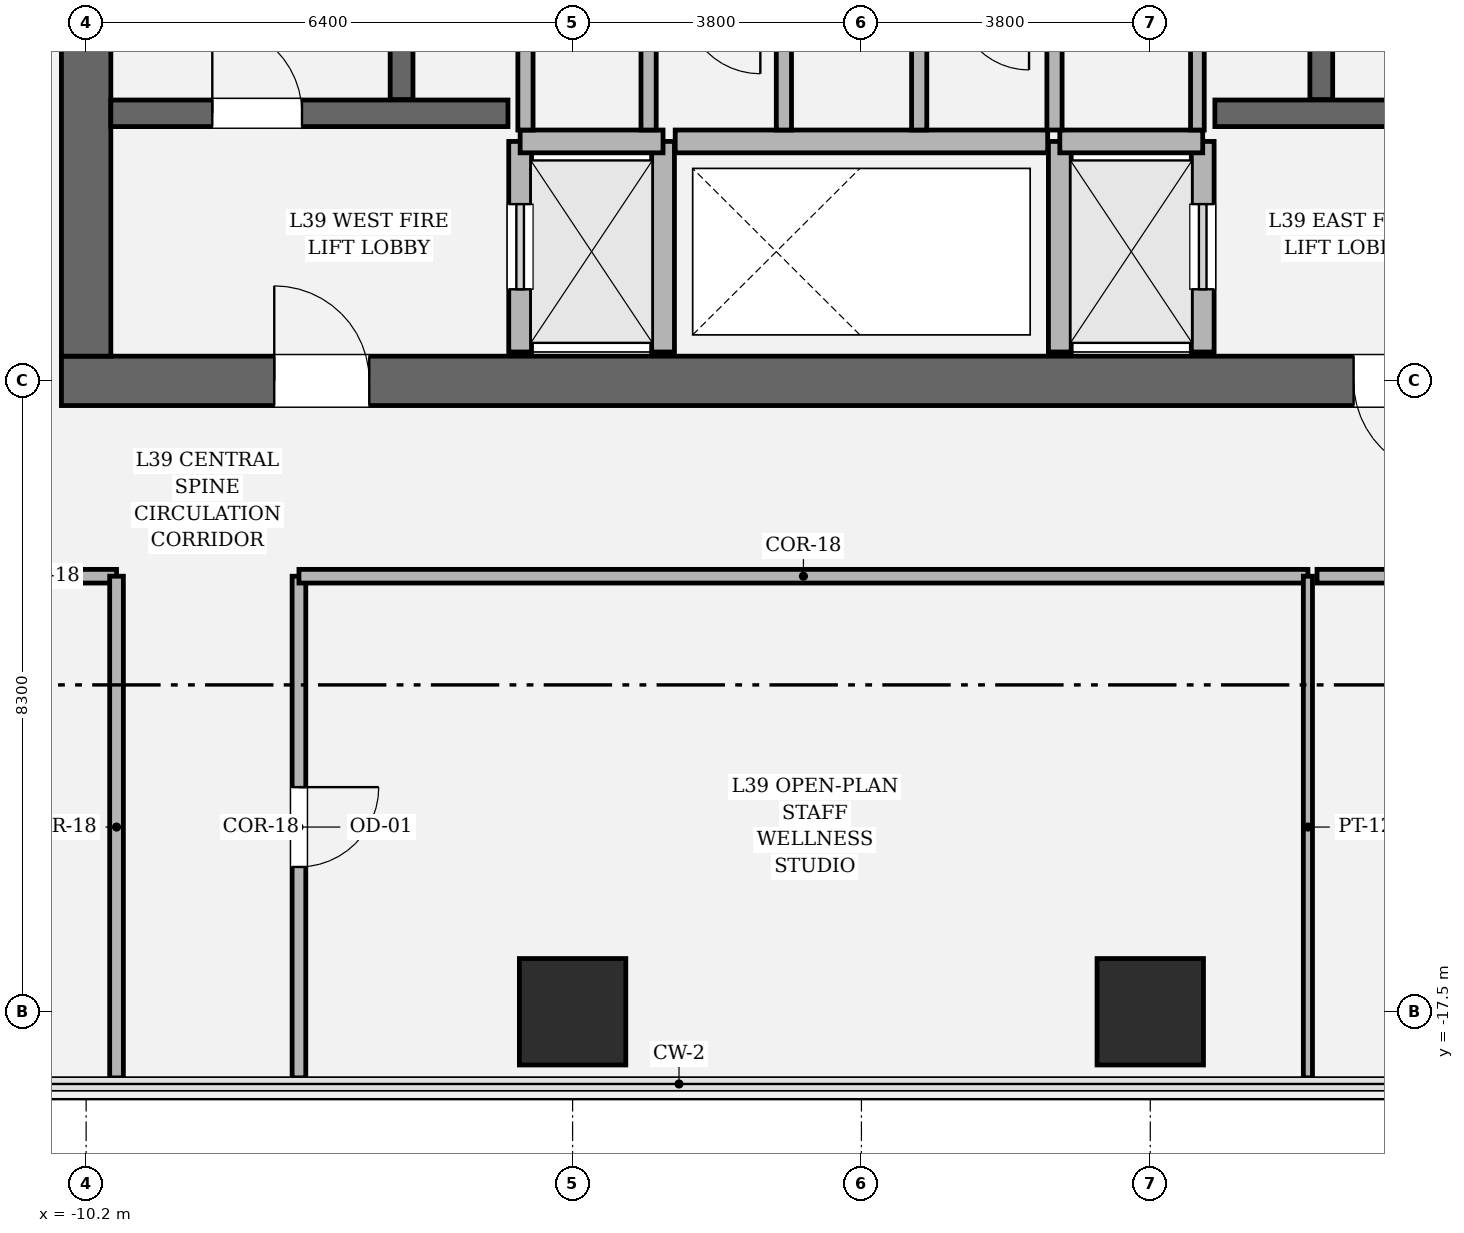
"""IFC4 building model, lengths in metres.
Left out: names, types, materials, properties, quantities, classifications, styles, units other than length and angle.
Written with IfcOpenShell. Run it as: python <this file> out.ifc"""

import sys

from ifc_helpers import new_model, si_unit, direction, frame, frame_2d, origin, origin_2d, place, context, subcontext, project, spatial, rectangle, hollow_rectangle, extrude, element, fill, save


model = new_model("IFC4")
c1 = context("Model", 3, precision=1e-05, world=origin(), true_north=direction((0.0, 1.0)))
c2 = subcontext(c1, "Body", "Model", "MODEL_VIEW")
j1 = project(units=[si_unit("LENGTHUNIT", "METRE"), si_unit("PLANEANGLEUNIT", "RADIAN")], contexts=[c1])
p1 = place(None, origin())
s1 = spatial("IfcSite", under=j1, at=p1, CompositionType="ELEMENT")
p2 = place(p1, origin())
s2 = spatial("IfcBuilding", under=s1, at=p2, CompositionType="ELEMENT")
p3 = place(p2, frame((0.0, 0.0, 168.15)))
s3 = spatial("IfcBuildingStorey", under=s2, at=p3, CompositionType="ELEMENT", Elevation=168.15)
p4 = place(p3, frame((10.525, -9.2, 0.0), z_axis=(0.0, 0.0, 1.0), x_axis=(-1.0, 0.0, 0.0)))
e1 = element("IfcWall", 1, at=p4, inside=s3, PredefinedType="SHEAR", context=c2, shape_type="SweptSolid", body=[
    extrude(rectangle(XDim=21.05, YDim=0.65, at=frame_2d((10.525, 0.0))), origin(), (0.0, 0.0, 1.0), 4.05),
])
p5 = place(p4, frame((2.8, 0.0, 0.0)))
e2 = element("IfcOpeningElement", 2, at=p5, cuts=e1, PredefinedType="OPENING", context=c2, shape_type="SweptSolid", body=[
    extrude(rectangle(XDim=1.25, YDim=2.25, at=frame_2d((0.625, 1.125))), frame((0.0, 0.335, 0.0), z_axis=(0.0, -1.0, 0.0), x_axis=(1.0, 0.0, 0.0)), (0.0, 0.0, 1.0), 0.67),
])
p6 = place(p4, frame((17.0, 0.0, 0.0)))
e3 = element("IfcOpeningElement", 3, at=p6, cuts=e1, PredefinedType="OPENING", context=c2, shape_type="SweptSolid", body=[
    extrude(rectangle(XDim=1.25, YDim=2.25, at=frame_2d((0.625, 1.125))), frame((0.0, 0.335, 0.0), z_axis=(0.0, -1.0, 0.0), x_axis=(1.0, 0.0, 0.0)), (0.0, 0.0, 1.0), 0.67),
])
p7 = place(p3, frame((-10.2, -8.875, 0.0), z_axis=(0.0, 0.0, 1.0), x_axis=(0.0, 1.0, 0.0)))
e4 = element("IfcWall", 4, at=p7, inside=s3, PredefinedType="SHEAR", context=c2, shape_type="SweptSolid", body=[
    extrude(rectangle(XDim=17.75, YDim=0.65, at=frame_2d((8.875, 0.0))), origin(), (0.0, 0.0, 1.0), 4.05),
])
p8 = place(p7, frame((12.665, 0.0, 0.0)))
e5 = element("IfcOpeningElement", 5, at=p8, cuts=e4, PredefinedType="OPENING", context=c2, shape_type="SweptSolid", body=[
    extrude(rectangle(XDim=1.18, YDim=2.2, at=frame_2d((0.59, 1.1))), frame((0.0, 0.335, 0.0), z_axis=(0.0, -1.0, 0.0), x_axis=(1.0, 0.0, 0.0)), (0.0, 0.0, 1.0), 0.67),
])
for number, where, z_axis, x_axis in (
    (6, (-6.05, -5.5, 0.0), (0.0, 0.0, 1.0), (0.0, 1.0, 0.0)),
    (7, (6.05, 3.45, 0.0), (0.0, 0.0, 1.0), (0.0, -1.0, 0.0)),
):
    element("IfcWall", number, at=place(p3, frame(where, z_axis=z_axis, x_axis=x_axis)), inside=s3, PredefinedType="SOLIDWALL", context=c2, shape_type="SweptSolid", body=[
        extrude(rectangle(XDim=8.95, YDim=0.3, at=frame_2d((4.475, 0.0))), origin(), (0.0, 0.0, 1.0), 4.05),
    ])
p9 = place(p3, frame((-9.875, -5.68, 0.0), z_axis=(0.0, 0.0, 1.0), x_axis=(1.0, 0.0, 0.0)))
e8 = element("IfcWall", 8, at=p9, inside=s3, PredefinedType="SOLIDWALL", context=c2, shape_type="SweptSolid", body=[
    extrude(rectangle(XDim=5.225, YDim=0.35, at=frame_2d((2.613, 0.0))), origin(), (0.0, 0.0, 1.0), 4.05),
])
p10 = place(p9, frame((1.335, 0.0, 0.0)))
e9 = element("IfcOpeningElement", 9, at=p10, cuts=e8, PredefinedType="OPENING", context=c2, shape_type="SweptSolid", body=[
    extrude(rectangle(XDim=1.18, YDim=2.2, at=frame_2d((0.59, 1.1))), frame((0.0, 0.185, 0.0), z_axis=(0.0, -1.0, 0.0), x_axis=(1.0, 0.0, 0.0)), (0.0, 0.0, 1.0), 0.37),
])
p11 = place(p3, frame((4.65, -5.68, 0.0), z_axis=(0.0, 0.0, 1.0), x_axis=(1.0, 0.0, 0.0)))
e10 = element("IfcWall", 10, at=p11, inside=s3, PredefinedType="SOLIDWALL", context=c2, shape_type="SweptSolid", body=[
    extrude(rectangle(XDim=5.225, YDim=0.35, at=frame_2d((2.613, 0.0))), origin(), (0.0, 0.0, 1.0), 4.05),
])
p12 = place(p11, frame((2.71, 0.0, 0.0)))
e11 = element("IfcOpeningElement", 11, at=p12, cuts=e10, PredefinedType="OPENING", context=c2, shape_type="SweptSolid", body=[
    extrude(rectangle(XDim=1.18, YDim=2.2, at=frame_2d((0.59, 1.1))), frame((0.0, 0.185, 0.0), z_axis=(0.0, -1.0, 0.0), x_axis=(1.0, 0.0, 0.0)), (0.0, 0.0, 1.0), 0.37),
])
for number, where, z_axis, x_axis in (
    (12, (-3.8, -17.5, 0.0), (0.0, 0.0, 1.0), (1.0, 0.0, 0.0)),
    (13, (3.8, -17.5, 0.0), (0.0, 0.0, 1.0), (1.0, 0.0, 0.0)),
):
    element("IfcColumn", number, at=place(p3, frame(where, z_axis=z_axis, x_axis=x_axis)), inside=s3, PredefinedType="COLUMN", context=c2, shape_type="SweptSolid", body=[
        extrude(hollow_rectangle(XDim=1.4, YDim=1.4, WallThickness=0.042, at=origin_2d()), origin(), (0.0, 0.0, 1.0), 4.05),
    ])
p13 = place(p3, frame((-4.49, -8.82, 0.0), z_axis=(0.0, 0.0, 1.0), x_axis=(0.0, 1.0, 0.0)))
e14 = element("IfcWall", 14, at=p13, inside=s3, PredefinedType="SOLIDWALL", context=c2, shape_type="SweptSolid", body=[
    extrude(rectangle(XDim=2.77, YDim=0.3, at=frame_2d((1.385, 0.0))), origin(), (0.0, 0.0, 1.0), 3.77),
])
p14 = place(p13, frame((0.825, 0.0, 0.0)))
e15 = element("IfcOpeningElement", 15, at=p14, cuts=e14, PredefinedType="OPENING", context=c2, shape_type="SweptSolid", body=[
    extrude(rectangle(XDim=1.12, YDim=2.25, at=frame_2d((0.56, 1.125))), frame((0.0, 0.16, 0.0), z_axis=(0.0, -1.0, 0.0), x_axis=(1.0, 0.0, 0.0)), (0.0, 0.0, 1.0), 0.32),
])
p15 = place(p3, frame((-2.61, -8.82, 0.0), z_axis=(0.0, 0.0, 1.0), x_axis=(0.0, 1.0, 0.0)))
e16 = element("IfcWall", 16, at=p15, inside=s3, PredefinedType="SOLIDWALL", context=c2, shape_type="SweptSolid", body=[
    extrude(rectangle(XDim=2.77, YDim=0.3, at=frame_2d((1.385, 0.0))), origin(), (0.0, 0.0, 1.0), 3.77),
])
p16 = place(p3, frame((-4.49, -6.05, 0.0), z_axis=(0.0, 0.0, 1.0), x_axis=(1.0, 0.0, 0.0)))
e17 = element("IfcWall", 17, at=p16, inside=s3, PredefinedType="SOLIDWALL", context=c2, shape_type="SweptSolid", body=[
    extrude(rectangle(XDim=1.88, YDim=0.3, at=frame_2d((0.94, 0.0))), origin(), (0.0, 0.0, 1.0), 3.77),
])
p17 = place(p3, frame((4.49, -8.82, 0.0), z_axis=(0.0, 0.0, 1.0), x_axis=(0.0, 1.0, 0.0)))
e18 = element("IfcWall", 18, at=p17, inside=s3, PredefinedType="SOLIDWALL", context=c2, shape_type="SweptSolid", body=[
    extrude(rectangle(XDim=2.77, YDim=0.3, at=frame_2d((1.385, 0.0))), origin(), (0.0, 0.0, 1.0), 3.77),
])
p18 = place(p17, frame((0.825, 0.0, 0.0)))
e19 = element("IfcOpeningElement", 19, at=p18, cuts=e18, PredefinedType="OPENING", context=c2, shape_type="SweptSolid", body=[
    extrude(rectangle(XDim=1.12, YDim=2.25, at=frame_2d((0.56, 1.125))), frame((0.0, 0.16, 0.0), z_axis=(0.0, -1.0, 0.0), x_axis=(1.0, 0.0, 0.0)), (0.0, 0.0, 1.0), 0.32),
])
p19 = place(p3, frame((2.61, -8.82, 0.0), z_axis=(0.0, 0.0, 1.0), x_axis=(0.0, 1.0, 0.0)))
e20 = element("IfcWall", 20, at=p19, inside=s3, PredefinedType="SOLIDWALL", context=c2, shape_type="SweptSolid", body=[
    extrude(rectangle(XDim=2.77, YDim=0.3, at=frame_2d((1.385, 0.0))), origin(), (0.0, 0.0, 1.0), 3.77),
])
p20 = place(p3, frame((2.61, -6.05, 0.0), z_axis=(0.0, 0.0, 1.0), x_axis=(1.0, 0.0, 0.0)))
e21 = element("IfcWall", 21, at=p20, inside=s3, PredefinedType="SOLIDWALL", context=c2, shape_type="SweptSolid", body=[
    extrude(rectangle(XDim=1.88, YDim=0.3, at=frame_2d((0.94, 0.0))), origin(), (0.0, 0.0, 1.0), 3.77),
])
p21 = place(p3, frame((-2.45, -6.05, 0.0), z_axis=(0.0, 0.0, 1.0), x_axis=(1.0, 0.0, 0.0)))
e22 = element("IfcWall", 22, at=p21, inside=s3, PredefinedType="SOLIDWALL", context=c2, shape_type="SweptSolid", body=[
    extrude(rectangle(XDim=4.9, YDim=0.3, at=frame_2d((2.45, 0.0))), origin(), (0.0, 0.0, 1.0), 3.77),
])
for number, where, z_axis, x_axis in (
    (23, (-2.8, -5.9, 0.0), (0.0, 0.0, 1.0), (0.0, 1.0, 0.0)),
    (24, (-4.42, -4.16, 0.0), (0.0, 0.0, 1.0), (0.0, -1.0, 0.0)),
    (25, (-1.02, -5.9, 0.0), (0.0, 0.0, 1.0), (0.0, 1.0, 0.0)),
    (26, (0.76, -5.9, 0.0), (0.0, 0.0, 1.0), (0.0, 1.0, 0.0)),
    (27, (2.54, -5.9, 0.0), (0.0, 0.0, 1.0), (0.0, 1.0, 0.0)),
):
    element("IfcWall", number, at=place(p3, frame(where, z_axis=z_axis, x_axis=x_axis)), inside=s3, PredefinedType="SOLIDWALL", context=c2, shape_type="SweptSolid", body=[
        extrude(rectangle(XDim=1.74, YDim=0.2, at=frame_2d((0.87, 0.0))), origin(), (0.0, 0.0, 1.0), 3.77),
    ])
p22 = place(p3, frame((4.42, -5.9, 0.0), z_axis=(0.0, 0.0, 1.0), x_axis=(0.0, 1.0, 0.0)))
e28 = element("IfcWall", 28, at=p22, inside=s3, PredefinedType="PARTITIONING", context=c2, shape_type="SweptSolid", body=[
    extrude(rectangle(XDim=1.74, YDim=0.18, at=frame_2d((0.87, 0.0))), origin(), (0.0, 0.0, 1.0), 3.77),
])
p23 = place(p3, frame((-7.4, -18.37, 0.0), z_axis=(0.0, 0.0, 1.0), x_axis=(0.0, 1.0, 0.0)))
e29 = element("IfcWall", 29, at=p23, inside=s3, PredefinedType="PARTITIONING", context=c2, shape_type="SweptSolid", body=[
    extrude(rectangle(XDim=6.6, YDim=0.18, at=frame_2d((3.3, 0.0))), origin(), (0.0, 0.0, 1.0), 2.444),
])
p24 = place(p23, frame((2.775, 0.0, 0.0)))
e30 = element("IfcOpeningElement", 30, at=p24, cuts=e29, PredefinedType="OPENING", context=c2, shape_type="SweptSolid", body=[
    extrude(rectangle(XDim=1.05, YDim=2.2, at=frame_2d((0.525, 1.1))), frame((0.0, 0.1, 0.0), z_axis=(0.0, -1.0, 0.0), x_axis=(1.0, 0.0, 0.0)), (0.0, 0.0, 1.0), 0.2),
])
p25 = place(p3, frame((-7.4, -11.77, 0.0), z_axis=(0.0, 0.0, 1.0), x_axis=(1.0, 0.0, 0.0)))
e31 = element("IfcWall", 31, at=p25, inside=s3, PredefinedType="PARTITIONING", context=c2, shape_type="SweptSolid", body=[
    extrude(rectangle(XDim=13.274, YDim=0.18, at=frame_2d((6.637, 0.0))), origin(), (0.0, 0.0, 1.0), 2.444),
])
p26 = place(p3, frame((5.874, -11.77, 0.0), z_axis=(0.0, 0.0, 1.0), x_axis=(0.0, -1.0, 0.0)))
e32 = element("IfcWall", 32, at=p26, inside=s3, PredefinedType="PARTITIONING", context=c2, shape_type="SweptSolid", body=[
    extrude(rectangle(XDim=6.6, YDim=0.12, at=frame_2d((3.3, 0.0))), origin(), (0.0, 0.0, 1.0), 2.444),
])
p27 = place(p3, frame((-12.77, -11.77, 0.0), z_axis=(0.0, 0.0, 1.0), x_axis=(1.0, 0.0, 0.0)))
e33 = element("IfcWall", 33, at=p27, inside=s3, PredefinedType="PARTITIONING", context=c2, shape_type="SweptSolid", body=[
    extrude(rectangle(XDim=2.97, YDim=0.18, at=frame_2d((1.485, 0.0))), origin(), (0.0, 0.0, 1.0), 2.444),
])
p28 = place(p27, frame((0.96, 0.0, 0.0)))
e34 = element("IfcOpeningElement", 34, at=p28, cuts=e33, PredefinedType="OPENING", context=c2, shape_type="SweptSolid", body=[
    extrude(rectangle(XDim=1.05, YDim=2.2, at=frame_2d((0.525, 1.1))), frame((0.0, 0.1, 0.0), z_axis=(0.0, -1.0, 0.0), x_axis=(1.0, 0.0, 0.0)), (0.0, 0.0, 1.0), 0.2),
])
p29 = place(p3, frame((-9.8, -11.77, 0.0), z_axis=(0.0, 0.0, 1.0), x_axis=(0.0, -1.0, 0.0)))
e35 = element("IfcWall", 35, at=p29, inside=s3, PredefinedType="PARTITIONING", context=c2, shape_type="SweptSolid", body=[
    extrude(rectangle(XDim=6.6, YDim=0.18, at=frame_2d((3.3, 0.0))), origin(), (0.0, 0.0, 1.0), 2.444),
])
p30 = place(p3, frame((5.994, -11.77, 0.0), z_axis=(0.0, 0.0, 1.0), x_axis=(1.0, 0.0, 0.0)))
e36 = element("IfcWall", 36, at=p30, inside=s3, PredefinedType="PARTITIONING", context=c2, shape_type="SweptSolid", body=[
    extrude(rectangle(XDim=6.776, YDim=0.18, at=frame_2d((3.388, 0.0))), origin(), (0.0, 0.0, 1.0), 2.444),
])
p31 = place(p30, frame((2.688, 0.0, 0.0)))
e37 = element("IfcOpeningElement", 37, at=p31, cuts=e36, PredefinedType="OPENING", context=c2, shape_type="SweptSolid", body=[
    extrude(rectangle(XDim=1.4, YDim=2.25, at=frame_2d((0.7, 1.125))), frame((0.0, 0.1, 0.0), z_axis=(0.0, -1.0, 0.0), x_axis=(1.0, 0.0, 0.0)), (0.0, 0.0, 1.0), 0.2),
])
p32 = place(p10, origin())
e38 = element("IfcDoor", 38, at=p32, inside=s3, OperationType="SINGLE_SWING_LEFT", PredefinedType="DOOR", context=c2, shape_type="SweptSolid", body=[
    extrude(rectangle(XDim=1.18, YDim=2.2, at=frame_2d((0.59, 1.1))), frame((0.0, 0.025, 0.0), z_axis=(0.0, -1.0, 0.0), x_axis=(1.0, 0.0, 0.0)), (0.0, 0.0, 1.0), 0.05),
])
fill(e9, e38)
p33 = place(p5, origin())
e39 = element("IfcDoor", 39, at=p33, inside=s3, OperationType="SINGLE_SWING_LEFT", PredefinedType="DOOR", context=c2, shape_type="SweptSolid", body=[
    extrude(rectangle(XDim=1.25, YDim=2.25, at=frame_2d((0.625, 1.125))), frame((0.0, 0.025, 0.0), z_axis=(0.0, -1.0, 0.0), x_axis=(1.0, 0.0, 0.0)), (0.0, 0.0, 1.0), 0.05),
])
fill(e2, e39)
p34 = place(p6, origin())
e40 = element("IfcDoor", 40, at=p34, inside=s3, OperationType="SINGLE_SWING_RIGHT", PredefinedType="DOOR", context=c2, shape_type="SweptSolid", body=[
    extrude(rectangle(XDim=1.25, YDim=2.25, at=frame_2d((0.625, 1.125))), frame((0.0, 0.025, 0.0), z_axis=(0.0, -1.0, 0.0), x_axis=(1.0, 0.0, 0.0)), (0.0, 0.0, 1.0), 0.05),
])
fill(e3, e40)
p35 = place(p14, origin())
e41 = element("IfcDoor", 41, at=p35, inside=s3, OperationType="SLIDING_TO_LEFT", PredefinedType="DOOR", context=c2, shape_type="SweptSolid", body=[
    extrude(rectangle(XDim=1.12, YDim=2.25, at=frame_2d((0.56, 1.125))), frame((0.0, 0.025, 0.0), z_axis=(0.0, -1.0, 0.0), x_axis=(1.0, 0.0, 0.0)), (0.0, 0.0, 1.0), 0.05),
])
fill(e15, e41)
p36 = place(p18, origin())
e42 = element("IfcDoor", 42, at=p36, inside=s3, OperationType="SLIDING_TO_RIGHT", PredefinedType="DOOR", context=c2, shape_type="SweptSolid", body=[
    extrude(rectangle(XDim=1.12, YDim=2.25, at=frame_2d((0.56, 1.125))), frame((0.0, 0.025, 0.0), z_axis=(0.0, -1.0, 0.0), x_axis=(1.0, 0.0, 0.0)), (0.0, 0.0, 1.0), 0.05),
])
fill(e19, e42)
p37 = place(p24, origin())
e43 = element("IfcDoor", 43, at=p37, inside=s3, OperationType="SINGLE_SWING_RIGHT", PredefinedType="DOOR", context=c2, shape_type="SweptSolid", body=[
    extrude(rectangle(XDim=1.05, YDim=2.2, at=frame_2d((0.525, 1.1))), frame((0.0, 0.025, 0.0), z_axis=(0.0, -1.0, 0.0), x_axis=(1.0, 0.0, 0.0)), (0.0, 0.0, 1.0), 0.05),
])
fill(e30, e43)
save(model, sys.argv[1])
